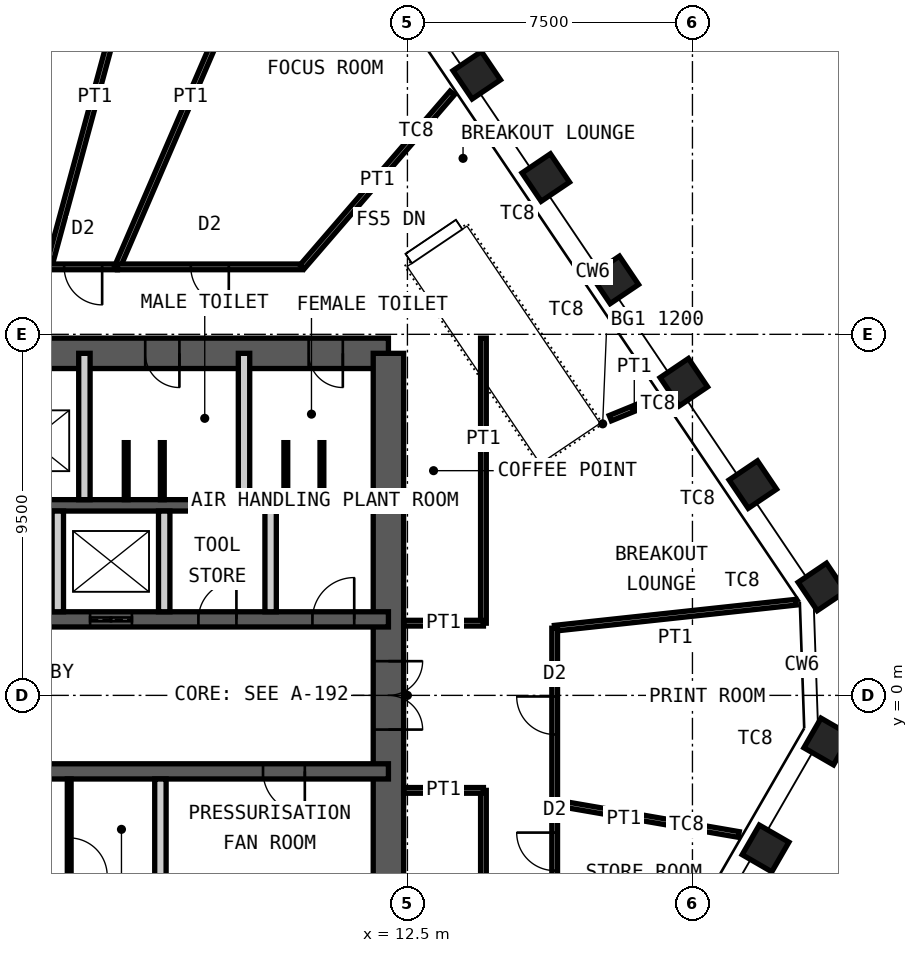
"""IFC4 building model, lengths in metres.
Left out: names, types, materials, properties, quantities, classifications, styles, units other than length and angle.
Written with IfcOpenShell. Run it as: python <this file> out.ifc"""

import sys

from ifc_helpers import new_model, si_unit, direction, frame, frame_2d, origin, origin_2d, place, context, subcontext, project, spatial, rectangle, hollow_rectangle, extrude, element, fill, save


model = new_model("IFC4")
c1 = context("Model", 3, precision=1e-05, world=origin(), true_north=direction((0.0, 1.0)))
c2 = subcontext(c1, "Body", "Model", "MODEL_VIEW")
j1 = project(units=[si_unit("LENGTHUNIT", "METRE"), si_unit("PLANEANGLEUNIT", "RADIAN")], contexts=[c1])
p1 = place(None, origin())
s1 = spatial("IfcSite", under=j1, at=p1, CompositionType="ELEMENT")
p2 = place(p1, origin())
s2 = spatial("IfcBuilding", under=s1, at=p2, CompositionType="ELEMENT")
p3 = place(p2, frame((0.0, 0.0, 329.2)))
s3 = spatial("IfcBuildingStorey", under=s2, at=p3, CompositionType="ELEMENT", Elevation=329.2)
for number, where, z_axis, x_axis in (
    (1, (14.324, 16.318, 0.0), (0.0, 0.0, 1.0), (-0.559, 0.829, 0.0)),
    (2, (16.141, 13.625, 0.0), (0.0, 0.0, 1.0), (-0.559, 0.829, 0.0)),
    (3, (17.957, 10.932, 0.0), (0.0, 0.0, 1.0), (-0.559, 0.829, 0.0)),
    (4, (19.773, 8.239, 0.0), (0.0, 0.0, 1.0), (-0.559, 0.829, 0.0)),
    (5, (21.589, 5.547, 0.0), (0.0, 0.0, 1.0), (-0.559, 0.829, 0.0)),
    (6, (23.406, 2.854, 0.0), (0.0, 0.0, 1.0), (-0.559, 0.829, 0.0)),
    (7, (23.548, -1.214, 0.0), (0.0, 0.0, 1.0), (0.5, 0.866, 0.0)),
    (8, (21.924, -4.027, 0.0), (0.0, 0.0, 1.0), (0.5, 0.866, 0.0)),
):
    element("IfcColumn", number, at=place(p3, frame(where, z_axis=z_axis, x_axis=x_axis)), inside=s3, PredefinedType="COLUMN", context=c2, shape_type="SweptSolid", body=[
        extrude(hollow_rectangle(XDim=0.9, YDim=0.9, WallThickness=0.05, at=origin_2d()), origin(), (0.0, 0.0, 1.0), 4.2),
    ])
p4 = place(p3, frame((-12.0, 9.0, 0.0), z_axis=(0.0, 0.0, 1.0), x_axis=(1.0, 0.0, 0.0)))
e9 = element("IfcWall", 9, at=p4, inside=s3, PredefinedType="SHEAR", context=c2, shape_type="SweptSolid", body=[
    extrude(rectangle(XDim=24.0, YDim=0.8, at=frame_2d((12.0, 0.0))), origin(), (0.0, 0.0, 1.0), 4.2),
])
p5 = place(p4, frame((10.4, 0.0, 0.0)))
e10 = element("IfcOpeningElement", 10, at=p5, cuts=e9, PredefinedType="OPENING", context=c2, shape_type="SweptSolid", body=[
    extrude(rectangle(XDim=1.0, YDim=2.1, at=frame_2d((0.5, 1.05))), frame((0.0, 0.41, 0.0), z_axis=(0.0, -1.0, 0.0), x_axis=(1.0, 0.0, 0.0)), (0.0, 0.0, 1.0), 0.82),
])
p6 = place(p4, frame((17.6, 0.0, 0.0)))
e11 = element("IfcOpeningElement", 11, at=p6, cuts=e9, PredefinedType="OPENING", context=c2, shape_type="SweptSolid", body=[
    extrude(rectangle(XDim=0.9, YDim=2.1, at=frame_2d((0.45, 1.05))), frame((0.0, 0.41, 0.0), z_axis=(0.0, -1.0, 0.0), x_axis=(1.0, 0.0, 0.0)), (0.0, 0.0, 1.0), 0.82),
])
p7 = place(p4, frame((21.9, 0.0, 0.0)))
e12 = element("IfcOpeningElement", 12, at=p7, cuts=e9, PredefinedType="OPENING", context=c2, shape_type="SweptSolid", body=[
    extrude(rectangle(XDim=0.9, YDim=2.1, at=frame_2d((0.45, 1.05))), frame((0.0, 0.41, 0.0), z_axis=(0.0, -1.0, 0.0), x_axis=(1.0, 0.0, 0.0)), (0.0, 0.0, 1.0), 0.82),
])
p8 = place(p3, frame((12.0, -9.0, 0.0), z_axis=(0.0, 0.0, 1.0), x_axis=(0.0, 1.0, 0.0)))
e13 = element("IfcWall", 13, at=p8, inside=s3, PredefinedType="SHEAR", context=c2, shape_type="SweptSolid", body=[
    extrude(rectangle(XDim=18.0, YDim=0.8, at=frame_2d((9.0, 0.0))), origin(), (0.0, 0.0, 1.0), 4.2),
])
p9 = place(p8, frame((8.1, 0.0, 0.0)))
e14 = element("IfcOpeningElement", 14, at=p9, cuts=e13, PredefinedType="OPENING", context=c2, shape_type="SweptSolid", body=[
    extrude(rectangle(XDim=1.8, YDim=2.1, at=frame_2d((0.9, 1.05))), frame((0.0, 0.41, 0.0), z_axis=(0.0, -1.0, 0.0), x_axis=(1.0, 0.0, 0.0)), (0.0, 0.0, 1.0), 0.82),
])
p10 = place(p3, frame((-12.0, 5.0, 0.0), z_axis=(0.0, 0.0, 1.0), x_axis=(1.0, 0.0, 0.0)))
e15 = element("IfcWall", 15, at=p10, inside=s3, PredefinedType="SHEAR", context=c2, shape_type="SweptSolid", body=[
    extrude(rectangle(XDim=24.0, YDim=0.3, at=frame_2d((12.0, 0.0))), origin(), (0.0, 0.0, 1.0), 4.2),
])
p11 = place(p3, frame((-12.0, 2.0, 0.0), z_axis=(0.0, 0.0, 1.0), x_axis=(1.0, 0.0, 0.0)))
e16 = element("IfcWall", 16, at=p11, inside=s3, PredefinedType="SHEAR", context=c2, shape_type="SweptSolid", body=[
    extrude(rectangle(XDim=24.0, YDim=0.4, at=frame_2d((12.0, 0.0))), origin(), (0.0, 0.0, 1.0), 4.2),
])
p12 = place(p11, frame((2.4, 0.0, 0.0)))
e17 = element("IfcOpeningElement", 17, at=p12, cuts=e16, PredefinedType="OPENING", context=c2, shape_type="SweptSolid", body=[
    extrude(rectangle(XDim=1.1, YDim=2.1, at=frame_2d((0.55, 1.05))), frame((0.0, 0.21, 0.0), z_axis=(0.0, -1.0, 0.0), x_axis=(1.0, 0.0, 0.0)), (0.0, 0.0, 1.0), 0.42),
])
p13 = place(p11, frame((22.0, 0.0, 0.0)))
e18 = element("IfcOpeningElement", 18, at=p13, cuts=e16, PredefinedType="OPENING", context=c2, shape_type="SweptSolid", body=[
    extrude(rectangle(XDim=1.1, YDim=2.1, at=frame_2d((0.55, 1.05))), frame((0.0, 0.21, 0.0), z_axis=(0.0, -1.0, 0.0), x_axis=(1.0, 0.0, 0.0)), (0.0, 0.0, 1.0), 0.42),
])
p14 = place(p11, frame((10.15, 0.0, 0.0)))
e19 = element("IfcOpeningElement", 19, at=p14, cuts=e16, PredefinedType="OPENING", context=c2, shape_type="SweptSolid", body=[
    extrude(rectangle(XDim=1.0, YDim=2.1, at=frame_2d((0.5, 1.05))), frame((0.0, 0.21, 0.0), z_axis=(0.0, -1.0, 0.0), x_axis=(1.0, 0.0, 0.0)), (0.0, 0.0, 1.0), 0.42),
])
p15 = place(p11, frame((6.9, 0.0, 0.0)))
e20 = element("IfcOpeningElement", 20, at=p15, cuts=e16, PredefinedType="OPENING", context=c2, shape_type="SweptSolid", body=[
    extrude(rectangle(XDim=1.0, YDim=2.1, at=frame_2d((0.5, 1.05))), frame((0.0, 0.21, 0.0), z_axis=(0.0, -1.0, 0.0), x_axis=(1.0, 0.0, 0.0)), (0.0, 0.0, 1.0), 0.42),
])
p16 = place(p11, frame((13.35, 0.0, 0.0)))
e21 = element("IfcOpeningElement", 21, at=p16, cuts=e16, PredefinedType="OPENING", context=c2, shape_type="SweptSolid", body=[
    extrude(rectangle(XDim=1.1, YDim=2.4, at=frame_2d((0.55, 1.2))), frame((0.0, 0.21, 0.0), z_axis=(0.0, -1.0, 0.0), x_axis=(1.0, 0.0, 0.0)), (0.0, 0.0, 1.0), 0.42),
])
p17 = place(p11, frame((16.15, 0.0, 0.0)))
e22 = element("IfcOpeningElement", 22, at=p17, cuts=e16, PredefinedType="OPENING", context=c2, shape_type="SweptSolid", body=[
    extrude(rectangle(XDim=1.1, YDim=2.4, at=frame_2d((0.55, 1.2))), frame((0.0, 0.21, 0.0), z_axis=(0.0, -1.0, 0.0), x_axis=(1.0, 0.0, 0.0)), (0.0, 0.0, 1.0), 0.42),
])
p18 = place(p11, frame((19.0, 0.0, 0.0)))
e23 = element("IfcOpeningElement", 23, at=p18, cuts=e16, PredefinedType="OPENING", context=c2, shape_type="SweptSolid", body=[
    extrude(rectangle(XDim=1.0, YDim=2.1, at=frame_2d((0.5, 1.05))), frame((0.0, 0.21, 0.0), z_axis=(0.0, -1.0, 0.0), x_axis=(1.0, 0.0, 0.0)), (0.0, 0.0, 1.0), 0.42),
])
p19 = place(p3, frame((-12.0, -2.0, 0.0), z_axis=(0.0, 0.0, 1.0), x_axis=(1.0, 0.0, 0.0)))
e24 = element("IfcWall", 24, at=p19, inside=s3, PredefinedType="SHEAR", context=c2, shape_type="SweptSolid", body=[
    extrude(rectangle(XDim=24.0, YDim=0.4, at=frame_2d((12.0, 0.0))), origin(), (0.0, 0.0, 1.0), 4.2),
])
p20 = place(p19, frame((1.1, 0.0, 0.0)))
e25 = element("IfcOpeningElement", 25, at=p20, cuts=e24, PredefinedType="OPENING", context=c2, shape_type="SweptSolid", body=[
    extrude(rectangle(XDim=1.1, YDim=2.1, at=frame_2d((0.55, 1.05))), frame((0.0, 0.21, 0.0), z_axis=(0.0, -1.0, 0.0), x_axis=(1.0, 0.0, 0.0)), (0.0, 0.0, 1.0), 0.42),
])
p21 = place(p19, frame((13.55, 0.0, 0.0)))
e26 = element("IfcOpeningElement", 26, at=p21, cuts=e24, PredefinedType="OPENING", context=c2, shape_type="SweptSolid", body=[
    extrude(rectangle(XDim=1.1, YDim=2.1, at=frame_2d((0.55, 1.05))), frame((0.0, 0.21, 0.0), z_axis=(0.0, -1.0, 0.0), x_axis=(1.0, 0.0, 0.0)), (0.0, 0.0, 1.0), 0.42),
])
p22 = place(p19, frame((20.7, 0.0, 0.0)))
e27 = element("IfcOpeningElement", 27, at=p22, cuts=e24, PredefinedType="OPENING", context=c2, shape_type="SweptSolid", body=[
    extrude(rectangle(XDim=1.1, YDim=2.1, at=frame_2d((0.55, 1.05))), frame((0.0, 0.21, 0.0), z_axis=(0.0, -1.0, 0.0), x_axis=(1.0, 0.0, 0.0)), (0.0, 0.0, 1.0), 0.42),
])
p23 = place(p19, frame((4.0, 0.0, 0.0)))
e28 = element("IfcOpeningElement", 28, at=p23, cuts=e24, PredefinedType="OPENING", context=c2, shape_type="SweptSolid", body=[
    extrude(rectangle(XDim=1.0, YDim=2.1, at=frame_2d((0.5, 1.05))), frame((0.0, 0.21, 0.0), z_axis=(0.0, -1.0, 0.0), x_axis=(1.0, 0.0, 0.0)), (0.0, 0.0, 1.0), 0.42),
])
p24 = place(p19, frame((6.8, 0.0, 0.0)))
e29 = element("IfcOpeningElement", 29, at=p24, cuts=e24, PredefinedType="OPENING", context=c2, shape_type="SweptSolid", body=[
    extrude(rectangle(XDim=1.0, YDim=2.1, at=frame_2d((0.5, 1.05))), frame((0.0, 0.21, 0.0), z_axis=(0.0, -1.0, 0.0), x_axis=(1.0, 0.0, 0.0)), (0.0, 0.0, 1.0), 0.42),
])
p25 = place(p19, frame((9.6, 0.0, 0.0)))
e30 = element("IfcOpeningElement", 30, at=p25, cuts=e24, PredefinedType="OPENING", context=c2, shape_type="SweptSolid", body=[
    extrude(rectangle(XDim=1.0, YDim=2.1, at=frame_2d((0.5, 1.05))), frame((0.0, 0.21, 0.0), z_axis=(0.0, -1.0, 0.0), x_axis=(1.0, 0.0, 0.0)), (0.0, 0.0, 1.0), 0.42),
])
for number, where, z_axis, x_axis in (
    (31, (4.0, 5.15, 0.0), (0.0, 0.0, 1.0), (0.0, 1.0, 0.0)),
    (32, (8.2, 5.15, 0.0), (0.0, 0.0, 1.0), (0.0, 1.0, 0.0)),
):
    element("IfcWall", number, at=place(p3, frame(where, z_axis=z_axis, x_axis=x_axis)), inside=s3, PredefinedType="PARTITIONING", context=c2, shape_type="SweptSolid", body=[
        extrude(rectangle(XDim=3.85, YDim=0.3, at=frame_2d((1.925, 0.0))), origin(), (0.0, 0.0, 1.0), 3.98),
    ])
for number, where, z_axis, x_axis in (
    (33, (3.3, 2.2, 0.0), (0.0, 0.0, 1.0), (0.0, 1.0, 0.0)),
    (34, (6.1, 2.2, 0.0), (0.0, 0.0, 1.0), (0.0, 1.0, 0.0)),
    (35, (8.9, 2.2, 0.0), (0.0, 0.0, 1.0), (0.0, 1.0, 0.0)),
    (36, (6.0, -4.85, 0.0), (0.0, 0.0, 1.0), (0.0, 1.0, 0.0)),
):
    element("IfcWall", number, at=place(p3, frame(where, z_axis=z_axis, x_axis=x_axis)), inside=s3, PredefinedType="PARTITIONING", context=c2, shape_type="SweptSolid", body=[
        extrude(rectangle(XDim=2.65, YDim=0.3, at=frame_2d((1.325, 0.0))), origin(), (0.0, 0.0, 1.0), 3.98),
    ])
p26 = place(p3, frame((3.6, -4.85, 0.0), z_axis=(0.0, 0.0, 1.0), x_axis=(0.0, 1.0, 0.0)))
e37 = element("IfcWall", 37, at=p26, inside=s3, PredefinedType="PARTITIONING", context=c2, shape_type="SweptSolid", body=[
    extrude(rectangle(XDim=2.65, YDim=0.1, at=frame_2d((1.325, 0.0))), origin(), (0.0, 0.0, 1.0), 3.98),
])
p27 = place(p26, frame((0.1, 0.0, 0.0)))
e38 = element("IfcOpeningElement", 38, at=p27, cuts=e37, PredefinedType="OPENING", context=c2, shape_type="SweptSolid", body=[
    extrude(rectangle(XDim=1.0, YDim=2.4, at=frame_2d((0.5, 1.2))), frame((0.0, 0.06, 0.0), z_axis=(0.0, -1.0, 0.0), x_axis=(1.0, 0.0, 0.0)), (0.0, 0.0, 1.0), 0.12),
])
for number, where, z_axis, x_axis in (
    (39, (5.1, 5.15, 0.0), (0.0, 0.0, 1.0), (0.0, 1.0, 0.0)),
    (40, (6.05, 5.15, 0.0), (0.0, 0.0, 1.0), (0.0, 1.0, 0.0)),
    (41, (9.3, 5.15, 0.0), (0.0, 0.0, 1.0), (0.0, 1.0, 0.0)),
    (42, (10.25, 5.15, 0.0), (0.0, 0.0, 1.0), (0.0, 1.0, 0.0)),
):
    element("IfcWall", number, at=place(p3, frame(where, z_axis=z_axis, x_axis=x_axis)), inside=s3, PredefinedType="PARTITIONING", context=c2, shape_type="SweptSolid", body=[
        extrude(rectangle(XDim=1.5, YDim=0.1, at=frame_2d((0.75, 0.0))), origin(), (0.0, 0.0, 1.0), 2.1),
    ])
p28 = place(p3, frame((5.492, 20.204, 0.0), z_axis=(0.0, 0.0, 1.0), x_axis=(-0.262302393053, -0.964985727666, 0.0)))
e43 = element("IfcWall", 43, at=p28, inside=s3, PredefinedType="PARTITIONING", context=c2, shape_type="SweptSolid", body=[
    extrude(rectangle(XDim=9.253, YDim=0.15, at=frame_2d((4.626, 0.0))), origin(), (0.0, 0.0, 1.0), 3.33),
])
p29 = place(p3, frame((3.065, 11.275, 0.0), z_axis=(0.0, 0.0, 1.0), x_axis=(1.0, 0.0, 0.0)))
e44 = element("IfcWall", 44, at=p29, inside=s3, PredefinedType="PARTITIONING", context=c2, shape_type="SweptSolid", body=[
    extrude(rectangle(XDim=1.804, YDim=0.15, at=frame_2d((0.902, 0.0))), origin(), (0.0, 0.0, 1.0), 4.03),
])
p30 = place(p29, frame((0.402, 0.0, 0.0)))
e45 = element("IfcOpeningElement", 45, at=p30, cuts=e44, PredefinedType="OPENING", context=c2, shape_type="SweptSolid", body=[
    extrude(rectangle(XDim=1.0, YDim=2.4, at=frame_2d((0.5, 1.2))), frame((0.0, 0.085, 0.0), z_axis=(0.0, -1.0, 0.0), x_axis=(1.0, 0.0, 0.0)), (0.0, 0.0, 1.0), 0.17),
])
p31 = place(p3, frame((8.726, 20.208, 0.0), z_axis=(0.0, 0.0, 1.0), x_axis=(-0.39644322536, -0.918059240499, 0.0)))
e46 = element("IfcWall", 46, at=p31, inside=s3, PredefinedType="PARTITIONING", context=c2, shape_type="SweptSolid", body=[
    extrude(rectangle(XDim=9.731, YDim=0.15, at=frame_2d((4.865, 0.0))), origin(), (0.0, 0.0, 1.0), 2.93),
])
p32 = place(p3, frame((4.869, 11.275, 0.0), z_axis=(0.0, 0.0, 1.0), x_axis=(1.0, 0.0, 0.0)))
e47 = element("IfcWall", 47, at=p32, inside=s3, PredefinedType="PARTITIONING", context=c2, shape_type="SweptSolid", body=[
    extrude(rectangle(XDim=4.861, YDim=0.15, at=frame_2d((2.431, 0.0))), origin(), (0.0, 0.0, 1.0), 4.03),
])
p33 = place(p32, frame((1.931, 0.0, 0.0)))
e48 = element("IfcOpeningElement", 48, at=p33, cuts=e47, PredefinedType="OPENING", context=c2, shape_type="SweptSolid", body=[
    extrude(rectangle(XDim=1.0, YDim=2.4, at=frame_2d((0.5, 1.2))), frame((0.0, 0.085, 0.0), z_axis=(0.0, -1.0, 0.0), x_axis=(1.0, 0.0, 0.0)), (0.0, 0.0, 1.0), 0.17),
])
p34 = place(p3, frame((13.678, 15.85, 0.0), z_axis=(0.0, 0.0, 1.0), x_axis=(-0.65333269737, -0.757070925704, 0.0)))
e49 = element("IfcWall", 49, at=p34, inside=s3, PredefinedType="PARTITIONING", context=c2, shape_type="SweptSolid", body=[
    extrude(rectangle(XDim=6.044, YDim=0.15, at=frame_2d((3.022, 0.0))), origin(), (0.0, 0.0, 1.0), 3.33),
])
p35 = place(p3, frame((19.1, 7.81, 0.0), z_axis=(0.0, 0.0, 1.0), x_axis=(-0.925595457991, -0.378514264125, 0.0)))
e50 = element("IfcWall", 50, at=p35, inside=s3, PredefinedType="PARTITIONING", context=c2, shape_type="SweptSolid", body=[
    extrude(rectangle(XDim=1.363, YDim=0.15, at=frame_2d((0.681, 0.0))), origin(), (0.0, 0.0, 1.0), 3.33),
])
p36 = place(p3, frame((22.726, 2.452, 0.0), z_axis=(0.0, 0.0, 1.0), x_axis=(-0.994232408241, -0.107246997175, 0.0)))
e51 = element("IfcWall", 51, at=p36, inside=s3, PredefinedType="PARTITIONING", context=c2, shape_type="SweptSolid", body=[
    extrude(rectangle(XDim=6.388, YDim=0.15, at=frame_2d((3.194, 0.0))), origin(), (0.0, 0.0, 1.0), 4.03),
])
p37 = place(p3, frame((16.375, 1.767, 0.0), z_axis=(0.0, 0.0, 1.0), x_axis=(0.0, -1.0, 0.0)))
e52 = element("IfcWall", 52, at=p37, inside=s3, PredefinedType="PARTITIONING", context=c2, shape_type="SweptSolid", body=[
    extrude(rectangle(XDim=4.591, YDim=0.15, at=frame_2d((2.296, 0.0))), origin(), (0.0, 0.0, 1.0), 4.03),
])
p38 = place(p37, frame((1.796, 0.0, 0.0)))
e53 = element("IfcOpeningElement", 53, at=p38, cuts=e52, PredefinedType="OPENING", context=c2, shape_type="SweptSolid", body=[
    extrude(rectangle(XDim=1.0, YDim=2.4, at=frame_2d((0.5, 1.2))), frame((0.0, 0.085, 0.0), z_axis=(0.0, -1.0, 0.0), x_axis=(1.0, 0.0, 0.0)), (0.0, 0.0, 1.0), 0.17),
])
p39 = place(p3, frame((21.219, -3.66, 0.0), z_axis=(0.0, 0.0, 1.0), x_axis=(-0.98545065103, 0.169961802723, 0.0)))
e54 = element("IfcWall", 54, at=p39, inside=s3, PredefinedType="PARTITIONING", context=c2, shape_type="SweptSolid", body=[
    extrude(rectangle(XDim=4.916, YDim=0.15, at=frame_2d((2.458, 0.0))), origin(), (0.0, 0.0, 1.0), 4.03),
])
p40 = place(p3, frame((16.375, -2.825, 0.0), z_axis=(0.0, 0.0, 1.0), x_axis=(0.0, -1.0, 0.0)))
e55 = element("IfcWall", 55, at=p40, inside=s3, PredefinedType="PARTITIONING", context=c2, shape_type="SweptSolid", body=[
    extrude(rectangle(XDim=2.572, YDim=0.15, at=frame_2d((1.286, 0.0))), origin(), (0.0, 0.0, 1.0), 4.03),
])
p41 = place(p40, frame((0.786, 0.0, 0.0)))
e56 = element("IfcOpeningElement", 56, at=p41, cuts=e55, PredefinedType="OPENING", context=c2, shape_type="SweptSolid", body=[
    extrude(rectangle(XDim=1.0, YDim=2.4, at=frame_2d((0.5, 1.2))), frame((0.0, 0.085, 0.0), z_axis=(0.0, -1.0, 0.0), x_axis=(1.0, 0.0, 0.0)), (0.0, 0.0, 1.0), 0.17),
])
p42 = place(p3, frame((14.5, 1.9, 0.0), z_axis=(0.0, 0.0, 1.0), x_axis=(0.0, 1.0, 0.0)))
e57 = element("IfcWall", 57, at=p42, inside=s3, PredefinedType="PARTITIONING", context=c2, shape_type="SweptSolid", body=[
    extrude(rectangle(XDim=7.5, YDim=0.15, at=frame_2d((3.75, 0.0))), origin(), (0.0, 0.0, 1.0), 4.03),
])
p43 = place(p3, frame((12.4, 1.9, 0.0), z_axis=(0.0, 0.0, 1.0), x_axis=(1.0, 0.0, 0.0)))
e58 = element("IfcWall", 58, at=p43, inside=s3, PredefinedType="PARTITIONING", context=c2, shape_type="SweptSolid", body=[
    extrude(rectangle(XDim=2.1, YDim=0.15, at=frame_2d((1.05, 0.0))), origin(), (0.0, 0.0, 1.0), 2.93),
])
p44 = place(p3, frame((14.5, -9.4, 0.0), z_axis=(0.0, 0.0, 1.0), x_axis=(0.0, 1.0, 0.0)))
e59 = element("IfcWall", 59, at=p44, inside=s3, PredefinedType="PARTITIONING", context=c2, shape_type="SweptSolid", body=[
    extrude(rectangle(XDim=6.9, YDim=0.15, at=frame_2d((3.45, 0.0))), origin(), (0.0, 0.0, 1.0), 4.03),
])
p45 = place(p3, frame((12.4, -2.5, 0.0), z_axis=(0.0, 0.0, 1.0), x_axis=(1.0, 0.0, 0.0)))
e60 = element("IfcWall", 60, at=p45, inside=s3, PredefinedType="PARTITIONING", context=c2, shape_type="SweptSolid", body=[
    extrude(rectangle(XDim=2.1, YDim=0.15, at=frame_2d((1.05, 0.0))), origin(), (0.0, 0.0, 1.0), 3.33),
])
p46 = place(p6, origin())
e61 = element("IfcDoor", 61, at=p46, inside=s3, OperationType="SINGLE_SWING_RIGHT", PredefinedType="DOOR", context=c2, shape_type="SweptSolid", body=[
    extrude(rectangle(XDim=0.9, YDim=2.1, at=frame_2d((0.45, 1.05))), frame((0.0, 0.025, 0.0), z_axis=(0.0, -1.0, 0.0), x_axis=(1.0, 0.0, 0.0)), (0.0, 0.0, 1.0), 0.05),
])
fill(e11, e61)
p47 = place(p7, origin())
e62 = element("IfcDoor", 62, at=p47, inside=s3, OperationType="SINGLE_SWING_RIGHT", PredefinedType="DOOR", context=c2, shape_type="SweptSolid", body=[
    extrude(rectangle(XDim=0.9, YDim=2.1, at=frame_2d((0.45, 1.05))), frame((0.0, 0.025, 0.0), z_axis=(0.0, -1.0, 0.0), x_axis=(1.0, 0.0, 0.0)), (0.0, 0.0, 1.0), 0.05),
])
fill(e12, e62)
p48 = place(p13, origin())
e63 = element("IfcDoor", 63, at=p48, inside=s3, OperationType="SINGLE_SWING_LEFT", PredefinedType="DOOR", context=c2, shape_type="SweptSolid", body=[
    extrude(rectangle(XDim=1.1, YDim=2.1, at=frame_2d((0.55, 1.05))), frame((0.0, 0.025, 0.0), z_axis=(0.0, -1.0, 0.0), x_axis=(1.0, 0.0, 0.0)), (0.0, 0.0, 1.0), 0.05),
])
fill(e18, e63)
p49 = place(p22, origin())
e64 = element("IfcDoor", 64, at=p49, inside=s3, OperationType="SINGLE_SWING_RIGHT", PredefinedType="DOOR", context=c2, shape_type="SweptSolid", body=[
    extrude(rectangle(XDim=1.1, YDim=2.1, at=frame_2d((0.55, 1.05))), frame((0.0, 0.025, 0.0), z_axis=(0.0, -1.0, 0.0), x_axis=(1.0, 0.0, 0.0)), (0.0, 0.0, 1.0), 0.05),
])
fill(e27, e64)
p50 = place(p9, origin())
e65 = element("IfcDoor", 65, at=p50, inside=s3, OperationType="DOUBLE_DOOR_DOUBLE_SWING", PredefinedType="DOOR", context=c2, shape_type="SweptSolid", body=[
    extrude(rectangle(XDim=1.8, YDim=2.1, at=frame_2d((0.9, 1.05))), frame((0.0, 0.025, 0.0), z_axis=(0.0, -1.0, 0.0), x_axis=(1.0, 0.0, 0.0)), (0.0, 0.0, 1.0), 0.05),
])
fill(e14, e65)
p51 = place(p17, origin())
e66 = element("IfcDoor", 66, at=p51, inside=s3, OperationType="DOUBLE_DOOR_SLIDING", PredefinedType="DOOR", context=c2, shape_type="SweptSolid", body=[
    extrude(rectangle(XDim=1.1, YDim=2.4, at=frame_2d((0.55, 1.2))), frame((0.0, 0.025, 0.0), z_axis=(0.0, -1.0, 0.0), x_axis=(1.0, 0.0, 0.0)), (0.0, 0.0, 1.0), 0.05),
])
fill(e22, e66)
p52 = place(p18, origin())
e67 = element("IfcDoor", 67, at=p52, inside=s3, OperationType="SINGLE_SWING_LEFT", PredefinedType="DOOR", context=c2, shape_type="SweptSolid", body=[
    extrude(rectangle(XDim=1.0, YDim=2.1, at=frame_2d((0.5, 1.05))), frame((0.0, 0.025, 0.0), z_axis=(0.0, -1.0, 0.0), x_axis=(1.0, 0.0, 0.0)), (0.0, 0.0, 1.0), 0.05),
])
fill(e23, e67)
p53 = place(p27, origin())
e68 = element("IfcDoor", 68, at=p53, inside=s3, OperationType="SINGLE_SWING_LEFT", PredefinedType="DOOR", context=c2, shape_type="SweptSolid", body=[
    extrude(rectangle(XDim=1.0, YDim=2.4, at=frame_2d((0.5, 1.2))), frame((0.0, 0.025, 0.0), z_axis=(0.0, -1.0, 0.0), x_axis=(1.0, 0.0, 0.0)), (0.0, 0.0, 1.0), 0.05),
])
fill(e38, e68)
p54 = place(p30, origin())
e69 = element("IfcDoor", 69, at=p54, inside=s3, OperationType="SINGLE_SWING_RIGHT", PredefinedType="DOOR", context=c2, shape_type="SweptSolid", body=[
    extrude(rectangle(XDim=1.0, YDim=2.4, at=frame_2d((0.5, 1.2))), frame((0.0, 0.025, 0.0), z_axis=(0.0, -1.0, 0.0), x_axis=(1.0, 0.0, 0.0)), (0.0, 0.0, 1.0), 0.05),
])
fill(e45, e69)
p55 = place(p33, origin())
e70 = element("IfcDoor", 70, at=p55, inside=s3, OperationType="SINGLE_SWING_RIGHT", PredefinedType="DOOR", context=c2, shape_type="SweptSolid", body=[
    extrude(rectangle(XDim=1.0, YDim=2.4, at=frame_2d((0.5, 1.2))), frame((0.0, 0.025, 0.0), z_axis=(0.0, -1.0, 0.0), x_axis=(1.0, 0.0, 0.0)), (0.0, 0.0, 1.0), 0.05),
])
fill(e48, e70)
p56 = place(p38, origin())
e71 = element("IfcDoor", 71, at=p56, inside=s3, OperationType="SINGLE_SWING_LEFT", PredefinedType="DOOR", context=c2, shape_type="SweptSolid", body=[
    extrude(rectangle(XDim=1.0, YDim=2.4, at=frame_2d((0.5, 1.2))), frame((0.0, 0.025, 0.0), z_axis=(0.0, -1.0, 0.0), x_axis=(1.0, 0.0, 0.0)), (0.0, 0.0, 1.0), 0.05),
])
fill(e53, e71)
p57 = place(p41, origin())
e72 = element("IfcDoor", 72, at=p57, inside=s3, OperationType="SINGLE_SWING_LEFT", PredefinedType="DOOR", context=c2, shape_type="SweptSolid", body=[
    extrude(rectangle(XDim=1.0, YDim=2.4, at=frame_2d((0.5, 1.2))), frame((0.0, 0.025, 0.0), z_axis=(0.0, -1.0, 0.0), x_axis=(1.0, 0.0, 0.0)), (0.0, 0.0, 1.0), 0.05),
])
fill(e56, e72)
save(model, sys.argv[1])
